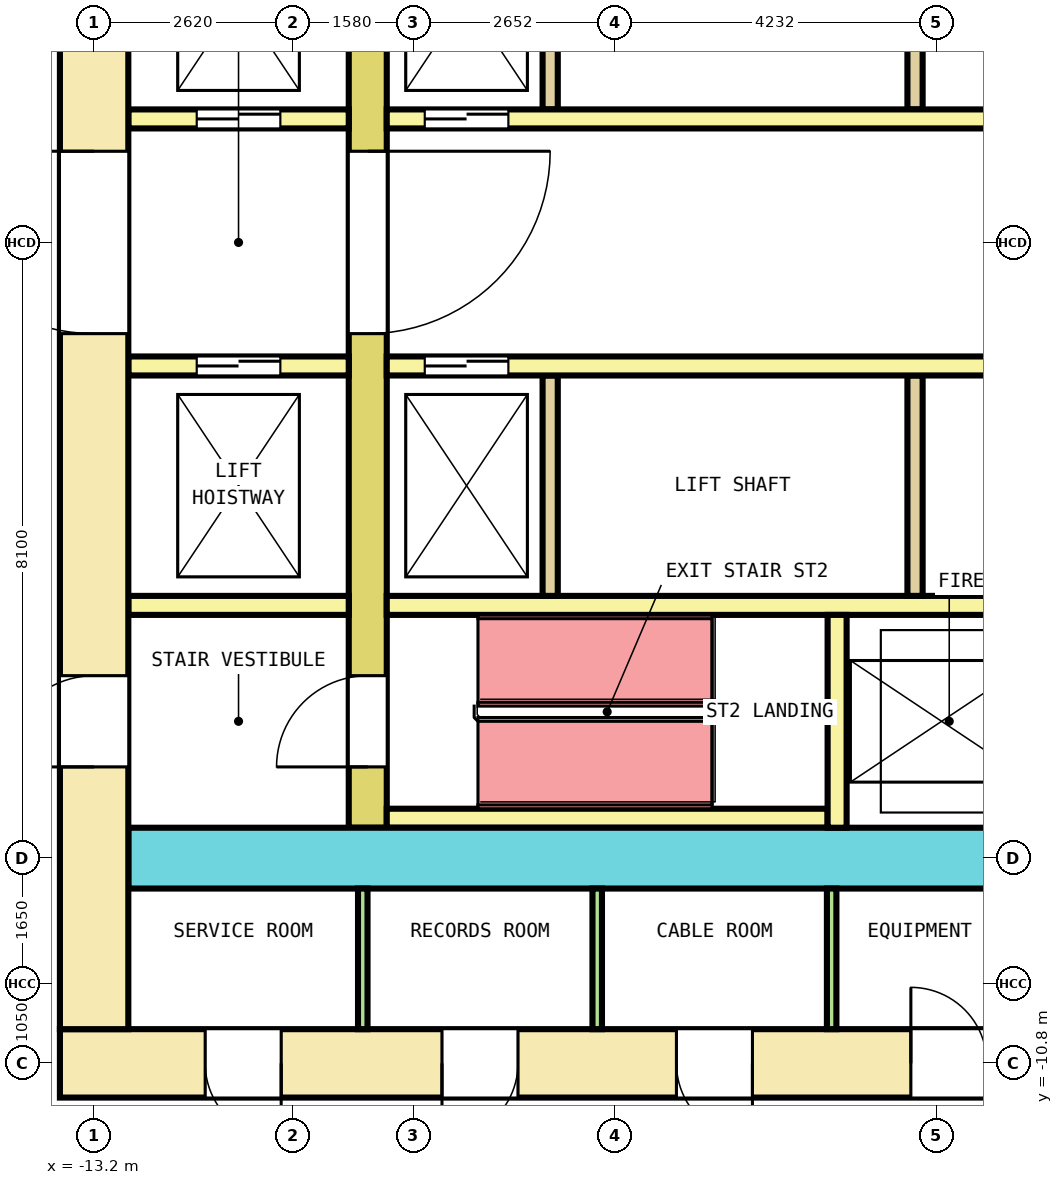
"""IFC4 building model, lengths in metres.
Left out: names, types, materials, properties, quantities, classifications, styles, units other than length and angle.
Written with IfcOpenShell. Run it as: python <this file> out.ifc"""

import sys

from ifc_helpers import new_model, si_unit, direction, frame, frame_2d, origin, place, context, subcontext, project, spatial, rectangle, extrude, element, fill, save


model = new_model("IFC4")
c1 = context("Model", 3, precision=1e-05, world=origin(), true_north=direction((0.0, 1.0)))
c2 = subcontext(c1, "Body", "Model", "MODEL_VIEW")
j1 = project(units=[si_unit("LENGTHUNIT", "METRE"), si_unit("PLANEANGLEUNIT", "RADIAN")], contexts=[c1])
p1 = place(None, origin())
s1 = spatial("IfcSite", under=j1, at=p1, CompositionType="ELEMENT")
p2 = place(p1, origin())
s2 = spatial("IfcBuilding", under=s1, at=p2, CompositionType="ELEMENT")
p3 = place(p2, frame((0.0, 0.0, 63.0)))
s3 = spatial("IfcBuildingStorey", under=s2, at=p3, CompositionType="ELEMENT", Elevation=63.0)
p4 = place(p3, frame((-13.65, -10.8, 0.0), z_axis=(0.0, 0.0, 1.0), x_axis=(1.0, 0.0, 0.0)))
e1 = element("IfcWall", 1, at=p4, inside=s3, PredefinedType="SHEAR", context=c2, shape_type="SweptSolid", body=[
    extrude(rectangle(XDim=27.3, YDim=0.9, at=frame_2d((13.65, 0.0))), origin(), (0.0, 0.0, 1.0), 4.1),
])
p5 = place(p4, frame((1.911, 0.0, 0.0)))
e2 = element("IfcOpeningElement", 2, at=p5, cuts=e1, PredefinedType="OPENING", context=c2, shape_type="SweptSolid", body=[
    extrude(rectangle(XDim=1.0, YDim=2.1, at=frame_2d((0.5, 1.05))), frame((0.0, 0.46, 0.0), z_axis=(0.0, -1.0, 0.0), x_axis=(1.0, 0.0, 0.0)), (0.0, 0.0, 1.0), 0.92),
])
p6 = place(p4, frame((5.027, 0.0, 0.0)))
e3 = element("IfcOpeningElement", 3, at=p6, cuts=e1, PredefinedType="OPENING", context=c2, shape_type="SweptSolid", body=[
    extrude(rectangle(XDim=1.0, YDim=2.1, at=frame_2d((0.5, 1.05))), frame((0.0, 0.46, 0.0), z_axis=(0.0, -1.0, 0.0), x_axis=(1.0, 0.0, 0.0)), (0.0, 0.0, 1.0), 0.92),
])
p7 = place(p4, frame((8.111, 0.0, 0.0)))
e4 = element("IfcOpeningElement", 4, at=p7, cuts=e1, PredefinedType="OPENING", context=c2, shape_type="SweptSolid", body=[
    extrude(rectangle(XDim=1.0, YDim=2.1, at=frame_2d((0.5, 1.05))), frame((0.0, 0.46, 0.0), z_axis=(0.0, -1.0, 0.0), x_axis=(1.0, 0.0, 0.0)), (0.0, 0.0, 1.0), 0.92),
])
p8 = place(p4, frame((11.195, 0.0, 0.0)))
e5 = element("IfcOpeningElement", 5, at=p8, cuts=e1, PredefinedType="OPENING", context=c2, shape_type="SweptSolid", body=[
    extrude(rectangle(XDim=1.0, YDim=2.1, at=frame_2d((0.5, 1.05))), frame((0.0, 0.46, 0.0), z_axis=(0.0, -1.0, 0.0), x_axis=(1.0, 0.0, 0.0)), (0.0, 0.0, 1.0), 0.92),
])
p9 = place(p4, frame((19.202, 0.0, 0.0)))
e6 = element("IfcOpeningElement", 6, at=p9, cuts=e1, PredefinedType="OPENING", context=c2, shape_type="SweptSolid", body=[
    extrude(rectangle(XDim=1.0, YDim=2.1, at=frame_2d((0.5, 1.05))), frame((0.0, 0.46, 0.0), z_axis=(0.0, -1.0, 0.0), x_axis=(1.0, 0.0, 0.0)), (0.0, 0.0, 1.0), 0.92),
])
p10 = place(p4, frame((21.881, 0.0, 0.0)))
e7 = element("IfcOpeningElement", 7, at=p10, cuts=e1, PredefinedType="OPENING", context=c2, shape_type="SweptSolid", body=[
    extrude(rectangle(XDim=1.0, YDim=2.1, at=frame_2d((0.5, 1.05))), frame((0.0, 0.46, 0.0), z_axis=(0.0, -1.0, 0.0), x_axis=(1.0, 0.0, 0.0)), (0.0, 0.0, 1.0), 0.92),
])
p11 = place(p4, frame((24.592, 0.0, 0.0)))
e8 = element("IfcOpeningElement", 8, at=p11, cuts=e1, PredefinedType="OPENING", context=c2, shape_type="SweptSolid", body=[
    extrude(rectangle(XDim=1.0, YDim=2.1, at=frame_2d((0.5, 1.05))), frame((0.0, 0.46, 0.0), z_axis=(0.0, -1.0, 0.0), x_axis=(1.0, 0.0, 0.0)), (0.0, 0.0, 1.0), 0.92),
])
p12 = place(p4, frame((15.2, 0.0, 0.0)))
e9 = element("IfcOpeningElement", 9, at=p12, cuts=e1, PredefinedType="OPENING", context=c2, shape_type="SweptSolid", body=[
    extrude(rectangle(XDim=1.2, YDim=2.1, at=frame_2d((0.6, 1.05))), frame((0.0, 0.46, 0.0), z_axis=(0.0, -1.0, 0.0), x_axis=(1.0, 0.0, 0.0)), (0.0, 0.0, 1.0), 0.92),
])
p13 = place(p3, frame((-13.2, -10.35, 0.0), z_axis=(0.0, 0.0, 1.0), x_axis=(0.0, 1.0, 0.0)))
e10 = element("IfcWall", 10, at=p13, inside=s3, PredefinedType="SHEAR", context=c2, shape_type="SweptSolid", body=[
    extrude(rectangle(XDim=20.7, YDim=0.9, at=frame_2d((10.35, 0.0))), origin(), (0.0, 0.0, 1.0), 4.1),
])
p14 = place(p13, frame((9.15, 0.0, 0.0)))
e11 = element("IfcOpeningElement", 11, at=p14, cuts=e10, PredefinedType="OPENING", context=c2, shape_type="SweptSolid", body=[
    extrude(rectangle(XDim=2.4, YDim=2.1, at=frame_2d((1.2, 1.05))), frame((0.0, 0.46, 0.0), z_axis=(0.0, -1.0, 0.0), x_axis=(1.0, 0.0, 0.0)), (0.0, 0.0, 1.0), 0.92),
])
p15 = place(p13, frame((16.05, 0.0, 0.0)))
e12 = element("IfcOpeningElement", 12, at=p15, cuts=e10, PredefinedType="OPENING", context=c2, shape_type="SweptSolid", body=[
    extrude(rectangle(XDim=1.2, YDim=2.1, at=frame_2d((0.6, 1.05))), frame((0.0, 0.46, 0.0), z_axis=(0.0, -1.0, 0.0), x_axis=(1.0, 0.0, 0.0)), (0.0, 0.0, 1.0), 0.92),
])
p16 = place(p13, frame((3.45, 0.0, 0.0)))
e13 = element("IfcOpeningElement", 13, at=p16, cuts=e10, PredefinedType="OPENING", context=c2, shape_type="SweptSolid", body=[
    extrude(rectangle(XDim=1.2, YDim=2.1, at=frame_2d((0.6, 1.05))), frame((0.0, 0.46, 0.0), z_axis=(0.0, -1.0, 0.0), x_axis=(1.0, 0.0, 0.0)), (0.0, 0.0, 1.0), 0.92),
])
p17 = place(p3, frame((-12.75, -8.1, 0.0), z_axis=(0.0, 0.0, 1.0), x_axis=(1.0, 0.0, 0.0)))
e14 = element("IfcWall", 14, at=p17, inside=s3, PredefinedType="SHEAR", context=c2, shape_type="SweptSolid", body=[
    extrude(rectangle(XDim=25.5, YDim=0.8, at=frame_2d((12.75, 0.0))), origin(), (0.0, 0.0, 1.0), 4.1),
])
p18 = place(p17, frame((14.3, 0.0, 0.0)))
e15 = element("IfcOpeningElement", 15, at=p18, cuts=e14, PredefinedType="OPENING", context=c2, shape_type="SweptSolid", body=[
    extrude(rectangle(XDim=1.2, YDim=2.1, at=frame_2d((0.6, 1.05))), frame((0.0, 0.41, 0.0), z_axis=(0.0, -1.0, 0.0), x_axis=(1.0, 0.0, 0.0)), (0.0, 0.0, 1.0), 0.82),
])
p19 = place(p3, frame((-9.6, -7.7, 0.0), z_axis=(0.0, 0.0, 1.0), x_axis=(0.0, 1.0, 0.0)))
e16 = element("IfcWall", 16, at=p19, inside=s3, PredefinedType="SHEAR", context=c2, shape_type="SweptSolid", body=[
    extrude(rectangle(XDim=15.4, YDim=0.5, at=frame_2d((7.7, 0.0))), origin(), (0.0, 0.0, 1.0), 4.1),
])
p20 = place(p19, frame((6.5, 0.0, 0.0)))
e17 = element("IfcOpeningElement", 17, at=p20, cuts=e16, PredefinedType="OPENING", context=c2, shape_type="SweptSolid", body=[
    extrude(rectangle(XDim=2.4, YDim=2.1, at=frame_2d((1.2, 1.05))), frame((0.0, 0.26, 0.0), z_axis=(0.0, -1.0, 0.0), x_axis=(1.0, 0.0, 0.0)), (0.0, 0.0, 1.0), 0.52),
])
p21 = place(p19, frame((13.4, 0.0, 0.0)))
e18 = element("IfcOpeningElement", 18, at=p21, cuts=e16, PredefinedType="OPENING", context=c2, shape_type="SweptSolid", body=[
    extrude(rectangle(XDim=1.2, YDim=2.1, at=frame_2d((0.6, 1.05))), frame((0.0, 0.26, 0.0), z_axis=(0.0, -1.0, 0.0), x_axis=(1.0, 0.0, 0.0)), (0.0, 0.0, 1.0), 0.52),
])
p22 = place(p19, frame((0.8, 0.0, 0.0)))
e19 = element("IfcOpeningElement", 19, at=p22, cuts=e16, PredefinedType="OPENING", context=c2, shape_type="SweptSolid", body=[
    extrude(rectangle(XDim=1.2, YDim=2.1, at=frame_2d((0.6, 1.05))), frame((0.0, 0.26, 0.0), z_axis=(0.0, -1.0, 0.0), x_axis=(1.0, 0.0, 0.0)), (0.0, 0.0, 1.0), 0.52),
])
p23 = place(p3, frame((-12.75, 1.625, 0.0), z_axis=(0.0, 0.0, 1.0), x_axis=(1.0, 0.0, 0.0)))
e20 = element("IfcWall", 20, at=p23, inside=s3, PredefinedType="SOLIDWALL", context=c2, shape_type="SweptSolid", body=[
    extrude(rectangle(XDim=2.9, YDim=0.25, at=frame_2d((1.45, 0.0))), origin(), (0.0, 0.0, 1.0), 4.1),
])
p24 = place(p23, frame((0.9, 0.0, 0.0)))
e21 = element("IfcOpeningElement", 21, at=p24, cuts=e20, PredefinedType="OPENING", context=c2, shape_type="SweptSolid", body=[
    extrude(rectangle(XDim=1.1, YDim=2.1, at=frame_2d((0.55, 1.05))), frame((0.0, 0.135, 0.0), z_axis=(0.0, -1.0, 0.0), x_axis=(1.0, 0.0, 0.0)), (0.0, 0.0, 1.0), 0.27),
])
p25 = place(p3, frame((-9.35, 1.625, 0.0), z_axis=(0.0, 0.0, 1.0), x_axis=(1.0, 0.0, 0.0)))
e22 = element("IfcWall", 22, at=p25, inside=s3, PredefinedType="SOLIDWALL", context=c2, shape_type="SweptSolid", body=[
    extrude(rectangle(XDim=18.7, YDim=0.25, at=frame_2d((9.35, 0.0))), origin(), (0.0, 0.0, 1.0), 4.1),
])
p26 = place(p25, frame((0.5, 0.0, 0.0)))
e23 = element("IfcOpeningElement", 23, at=p26, cuts=e22, PredefinedType="OPENING", context=c2, shape_type="SweptSolid", body=[
    extrude(rectangle(XDim=1.1, YDim=2.1, at=frame_2d((0.55, 1.05))), frame((0.0, 0.135, 0.0), z_axis=(0.0, -1.0, 0.0), x_axis=(1.0, 0.0, 0.0)), (0.0, 0.0, 1.0), 0.27),
])
p27 = place(p25, frame((17.1, 0.0, 0.0)))
e24 = element("IfcOpeningElement", 24, at=p27, cuts=e22, PredefinedType="OPENING", context=c2, shape_type="SweptSolid", body=[
    extrude(rectangle(XDim=1.1, YDim=2.1, at=frame_2d((0.55, 1.05))), frame((0.0, 0.135, 0.0), z_axis=(0.0, -1.0, 0.0), x_axis=(1.0, 0.0, 0.0)), (0.0, 0.0, 1.0), 0.27),
])
for number, where, z_axis, x_axis in (
    (25, (-7.2, 1.75, 0.0), (0.0, 0.0, 1.0), (0.0, 1.0, 0.0)),
    (26, (-2.4, 1.75, 0.0), (0.0, 0.0, 1.0), (0.0, 1.0, 0.0)),
):
    element("IfcWall", number, at=place(p3, frame(where, z_axis=z_axis, x_axis=x_axis)), inside=s3, PredefinedType="SOLIDWALL", context=c2, shape_type="SweptSolid", body=[
        extrude(rectangle(XDim=2.9, YDim=0.2, at=frame_2d((1.45, 0.0))), origin(), (0.0, 0.0, 1.0), 4.1),
    ])
p28 = place(p3, frame((-12.75, -1.625, 0.0), z_axis=(0.0, 0.0, 1.0), x_axis=(1.0, 0.0, 0.0)))
e27 = element("IfcWall", 27, at=p28, inside=s3, PredefinedType="SOLIDWALL", context=c2, shape_type="SweptSolid", body=[
    extrude(rectangle(XDim=2.9, YDim=0.25, at=frame_2d((1.45, 0.0))), origin(), (0.0, 0.0, 1.0), 4.1),
])
p29 = place(p28, frame((0.9, 0.0, 0.0)))
e28 = element("IfcOpeningElement", 28, at=p29, cuts=e27, PredefinedType="OPENING", context=c2, shape_type="SweptSolid", body=[
    extrude(rectangle(XDim=1.1, YDim=2.1, at=frame_2d((0.55, 1.05))), frame((0.0, 0.135, 0.0), z_axis=(0.0, -1.0, 0.0), x_axis=(1.0, 0.0, 0.0)), (0.0, 0.0, 1.0), 0.27),
])
p30 = place(p3, frame((-9.35, -1.625, 0.0), z_axis=(0.0, 0.0, 1.0), x_axis=(1.0, 0.0, 0.0)))
e29 = element("IfcWall", 29, at=p30, inside=s3, PredefinedType="SOLIDWALL", context=c2, shape_type="SweptSolid", body=[
    extrude(rectangle(XDim=18.7, YDim=0.25, at=frame_2d((9.35, 0.0))), origin(), (0.0, 0.0, 1.0), 4.1),
])
p31 = place(p30, frame((0.5, 0.0, 0.0)))
e30 = element("IfcOpeningElement", 30, at=p31, cuts=e29, PredefinedType="OPENING", context=c2, shape_type="SweptSolid", body=[
    extrude(rectangle(XDim=1.1, YDim=2.1, at=frame_2d((0.55, 1.05))), frame((0.0, 0.135, 0.0), z_axis=(0.0, -1.0, 0.0), x_axis=(1.0, 0.0, 0.0)), (0.0, 0.0, 1.0), 0.27),
])
p32 = place(p30, frame((17.1, 0.0, 0.0)))
e31 = element("IfcOpeningElement", 31, at=p32, cuts=e29, PredefinedType="OPENING", context=c2, shape_type="SweptSolid", body=[
    extrude(rectangle(XDim=1.1, YDim=2.1, at=frame_2d((0.55, 1.05))), frame((0.0, 0.135, 0.0), z_axis=(0.0, -1.0, 0.0), x_axis=(1.0, 0.0, 0.0)), (0.0, 0.0, 1.0), 0.27),
])
p33 = place(p3, frame((-12.75, -4.775, 0.0), z_axis=(0.0, 0.0, 1.0), x_axis=(1.0, 0.0, 0.0)))
e32 = element("IfcWall", 32, at=p33, inside=s3, PredefinedType="SOLIDWALL", context=c2, shape_type="SweptSolid", body=[
    extrude(rectangle(XDim=2.9, YDim=0.25, at=frame_2d((1.45, 0.0))), origin(), (0.0, 0.0, 1.0), 4.1),
])
p34 = place(p3, frame((-9.35, -4.775, 0.0), z_axis=(0.0, 0.0, 1.0), x_axis=(1.0, 0.0, 0.0)))
e33 = element("IfcWall", 33, at=p34, inside=s3, PredefinedType="SOLIDWALL", context=c2, shape_type="SweptSolid", body=[
    extrude(rectangle(XDim=18.7, YDim=0.25, at=frame_2d((9.35, 0.0))), origin(), (0.0, 0.0, 1.0), 4.1),
])
for number, where, z_axis, x_axis in (
    (34, (-7.2, -4.65, 0.0), (0.0, 0.0, 1.0), (0.0, 1.0, 0.0)),
    (35, (-2.4, -4.65, 0.0), (0.0, 0.0, 1.0), (0.0, 1.0, 0.0)),
):
    element("IfcWall", number, at=place(p3, frame(where, z_axis=z_axis, x_axis=x_axis)), inside=s3, PredefinedType="SOLIDWALL", context=c2, shape_type="SweptSolid", body=[
        extrude(rectangle(XDim=2.9, YDim=0.2, at=frame_2d((1.45, 0.0))), origin(), (0.0, 0.0, 1.0), 4.1),
    ])
p35 = place(p3, frame((-9.35, -7.575, 0.0), z_axis=(0.0, 0.0, 1.0), x_axis=(1.0, 0.0, 0.0)))
e36 = element("IfcWall", 36, at=p35, inside=s3, PredefinedType="SOLIDWALL", context=c2, shape_type="SweptSolid", body=[
    extrude(rectangle(XDim=5.8, YDim=0.25, at=frame_2d((2.9, 0.0))), origin(), (0.0, 0.0, 1.0), 4.1),
])
p36 = place(p3, frame((-3.425, -7.7, 0.0), z_axis=(0.0, 0.0, 1.0), x_axis=(0.0, 1.0, 0.0)))
e37 = element("IfcWall", 37, at=p36, inside=s3, PredefinedType="SOLIDWALL", context=c2, shape_type="SweptSolid", body=[
    extrude(rectangle(XDim=2.8, YDim=0.25, at=frame_2d((1.4, 0.0))), origin(), (0.0, 0.0, 1.0), 4.1),
])
for number, where, z_axis, x_axis in (
    (38, (-9.666, -10.35, 0.0), (0.0, 0.0, 1.0), (0.0, 1.0, 0.0)),
    (39, (-6.581, -10.35, 0.0), (0.0, 0.0, 1.0), (0.0, 1.0, 0.0)),
    (40, (-3.497, -10.35, 0.0), (0.0, 0.0, 1.0), (0.0, 1.0, 0.0)),
):
    element("IfcWall", number, at=place(p3, frame(where, z_axis=z_axis, x_axis=x_axis)), inside=s3, PredefinedType="PARTITIONING", context=c2, shape_type="SweptSolid", body=[
        extrude(rectangle(XDim=1.85, YDim=0.125, at=frame_2d((0.925, 0.0))), origin(), (0.0, 0.0, 1.0), 4.1),
    ])
p37 = place(p24, origin())
e41 = element("IfcDoor", 41, at=p37, inside=s3, OperationType="DOUBLE_DOOR_SLIDING", PredefinedType="DOOR", context=c2, shape_type="SweptSolid", body=[
    extrude(rectangle(XDim=1.1, YDim=2.1, at=frame_2d((0.55, 1.05))), frame((0.0, 0.075, 0.0), z_axis=(0.0, -1.0, 0.0), x_axis=(1.0, 0.0, 0.0)), (0.0, 0.0, 1.0), 0.15),
])
fill(e21, e41)
p38 = place(p26, origin())
e42 = element("IfcDoor", 42, at=p38, inside=s3, OperationType="DOUBLE_DOOR_SLIDING", PredefinedType="DOOR", context=c2, shape_type="SweptSolid", body=[
    extrude(rectangle(XDim=1.1, YDim=2.1, at=frame_2d((0.55, 1.05))), frame((0.0, 0.075, 0.0), z_axis=(0.0, -1.0, 0.0), x_axis=(1.0, 0.0, 0.0)), (0.0, 0.0, 1.0), 0.15),
])
fill(e23, e42)
p39 = place(p29, origin())
e43 = element("IfcDoor", 43, at=p39, inside=s3, OperationType="DOUBLE_DOOR_SLIDING", PredefinedType="DOOR", context=c2, shape_type="SweptSolid", body=[
    extrude(rectangle(XDim=1.1, YDim=2.1, at=frame_2d((0.55, 1.05))), frame((0.0, 0.075, 0.0), z_axis=(0.0, -1.0, 0.0), x_axis=(1.0, 0.0, 0.0)), (0.0, 0.0, 1.0), 0.15),
])
fill(e28, e43)
p40 = place(p31, origin())
e44 = element("IfcDoor", 44, at=p40, inside=s3, OperationType="DOUBLE_DOOR_SLIDING", PredefinedType="DOOR", context=c2, shape_type="SweptSolid", body=[
    extrude(rectangle(XDim=1.1, YDim=2.1, at=frame_2d((0.55, 1.05))), frame((0.0, 0.075, 0.0), z_axis=(0.0, -1.0, 0.0), x_axis=(1.0, 0.0, 0.0)), (0.0, 0.0, 1.0), 0.15),
])
fill(e30, e44)
p41 = place(p20, origin())
e45 = element("IfcDoor", 45, at=p41, inside=s3, OperationType="DOUBLE_DOOR_SINGLE_SWING", PredefinedType="DOOR", context=c2, shape_type="SweptSolid", body=[
    extrude(rectangle(XDim=2.4, YDim=2.1, at=frame_2d((1.2, 1.05))), frame((0.0, 0.2, 0.0), z_axis=(0.0, -1.0, 0.0), x_axis=(1.0, 0.0, 0.0)), (0.0, 0.0, 1.0), 0.4),
])
fill(e17, e45)
p42 = place(p14, origin())
e46 = element("IfcDoor", 46, at=p42, inside=s3, OperationType="DOUBLE_DOOR_SINGLE_SWING", PredefinedType="DOOR", context=c2, shape_type="SweptSolid", body=[
    extrude(rectangle(XDim=2.4, YDim=2.1, at=frame_2d((1.2, 1.05))), frame((0.0, 0.3, 0.0), z_axis=(0.0, -1.0, 0.0), x_axis=(1.0, 0.0, 0.0)), (0.0, 0.0, 1.0), 0.6),
])
fill(e11, e46)
p43 = place(p22, origin())
e47 = element("IfcDoor", 47, at=p43, inside=s3, OperationType="SINGLE_SWING_LEFT", PredefinedType="DOOR", context=c2, shape_type="SweptSolid", body=[
    extrude(rectangle(XDim=1.2, YDim=2.1, at=frame_2d((0.6, 1.05))), frame((0.0, 0.2, 0.0), z_axis=(0.0, -1.0, 0.0), x_axis=(1.0, 0.0, 0.0)), (0.0, 0.0, 1.0), 0.4),
])
fill(e19, e47)
p44 = place(p16, origin())
e48 = element("IfcDoor", 48, at=p44, inside=s3, OperationType="SINGLE_SWING_RIGHT", PredefinedType="DOOR", context=c2, shape_type="SweptSolid", body=[
    extrude(rectangle(XDim=1.2, YDim=2.1, at=frame_2d((0.6, 1.05))), frame((0.0, 0.3, 0.0), z_axis=(0.0, -1.0, 0.0), x_axis=(1.0, 0.0, 0.0)), (0.0, 0.0, 1.0), 0.6),
])
fill(e13, e48)
p45 = place(p5, origin())
e49 = element("IfcDoor", 49, at=p45, inside=s3, OperationType="SINGLE_SWING_LEFT", PredefinedType="DOOR", context=c2, shape_type="SweptSolid", body=[
    extrude(rectangle(XDim=1.0, YDim=2.1, at=frame_2d((0.5, 1.05))), frame((0.0, 0.3, 0.0), z_axis=(0.0, -1.0, 0.0), x_axis=(1.0, 0.0, 0.0)), (0.0, 0.0, 1.0), 0.6),
])
fill(e2, e49)
p46 = place(p6, origin())
e50 = element("IfcDoor", 50, at=p46, inside=s3, OperationType="SINGLE_SWING_RIGHT", PredefinedType="DOOR", context=c2, shape_type="SweptSolid", body=[
    extrude(rectangle(XDim=1.0, YDim=2.1, at=frame_2d((0.5, 1.05))), frame((0.0, 0.3, 0.0), z_axis=(0.0, -1.0, 0.0), x_axis=(1.0, 0.0, 0.0)), (0.0, 0.0, 1.0), 0.6),
])
fill(e3, e50)
p47 = place(p7, origin())
e51 = element("IfcDoor", 51, at=p47, inside=s3, OperationType="SINGLE_SWING_LEFT", PredefinedType="DOOR", context=c2, shape_type="SweptSolid", body=[
    extrude(rectangle(XDim=1.0, YDim=2.1, at=frame_2d((0.5, 1.05))), frame((0.0, 0.3, 0.0), z_axis=(0.0, -1.0, 0.0), x_axis=(1.0, 0.0, 0.0)), (0.0, 0.0, 1.0), 0.6),
])
fill(e4, e51)
p48 = place(p8, origin())
e52 = element("IfcDoor", 52, at=p48, inside=s3, OperationType="SINGLE_SWING_RIGHT", PredefinedType="DOOR", context=c2, shape_type="SweptSolid", body=[
    extrude(rectangle(XDim=1.0, YDim=2.1, at=frame_2d((0.5, 1.05))), frame((0.0, 0.3, 0.0), z_axis=(0.0, -1.0, 0.0), x_axis=(1.0, 0.0, 0.0)), (0.0, 0.0, 1.0), 0.6),
])
fill(e5, e52)
save(model, sys.argv[1])
